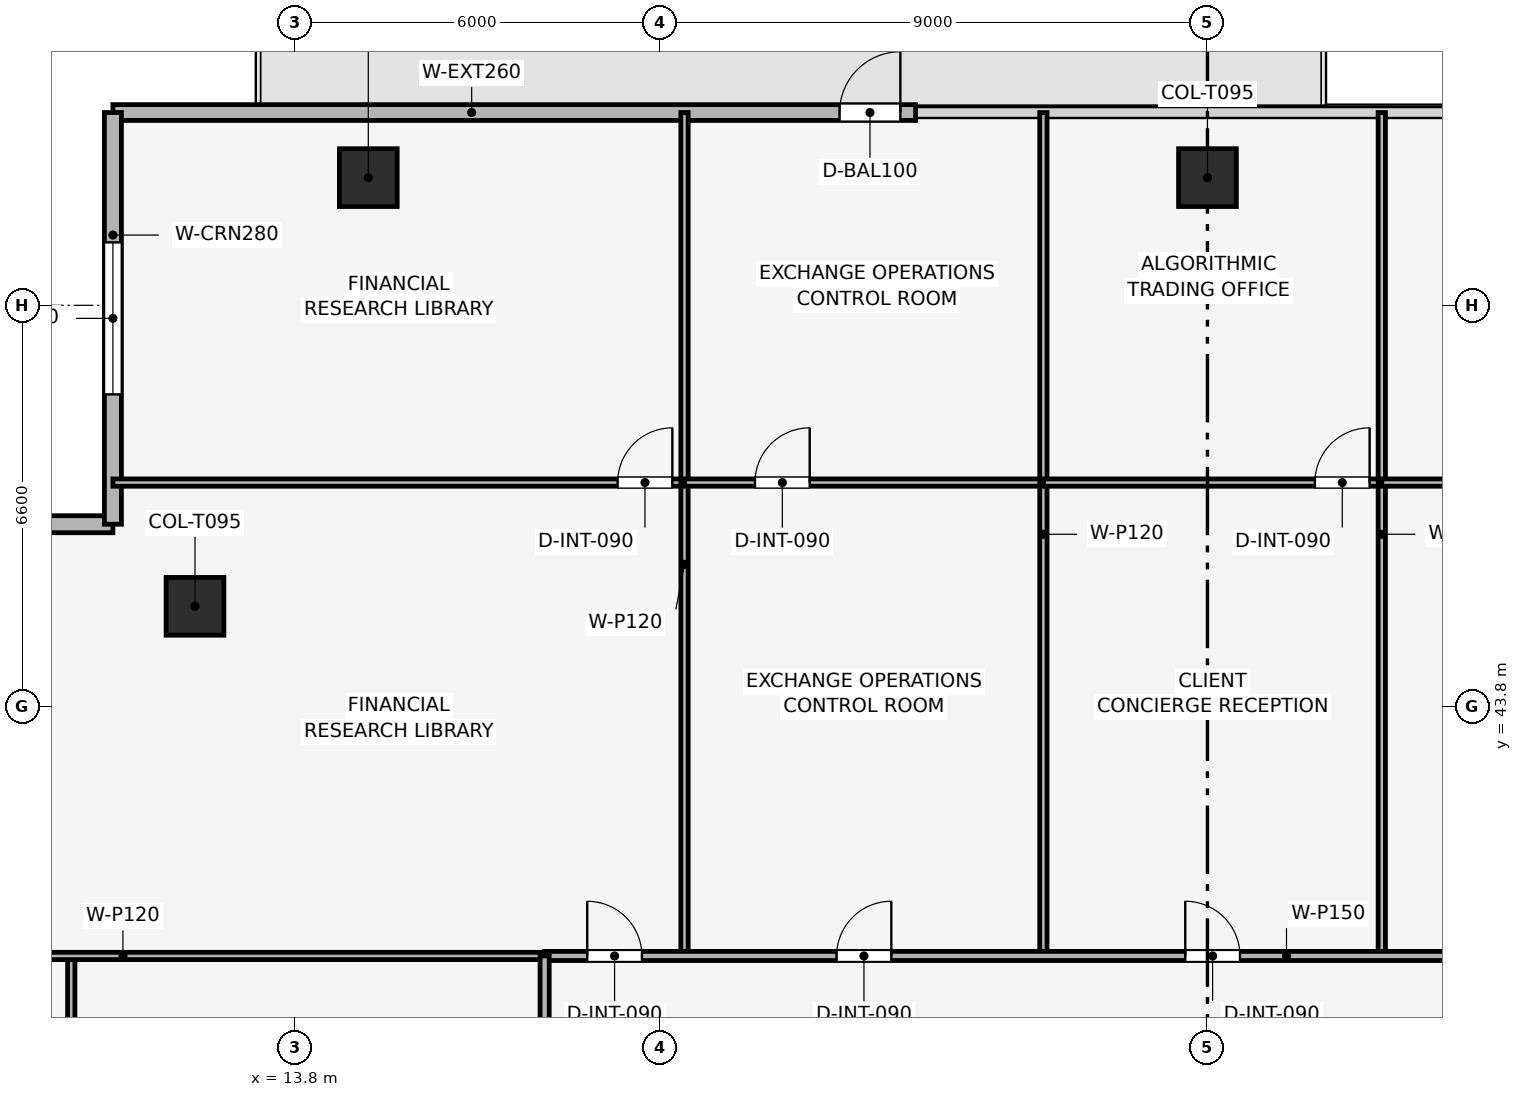
"""IFC4 building model, lengths in metres.
Left out: names, types, materials, properties, quantities, classifications, styles, units other than length and angle.
Written with IfcOpenShell. Run it as: python <this file> out.ifc"""

import sys

from ifc_helpers import new_model, si_unit, direction, frame, frame_2d, origin, origin_2d, place, context, subcontext, project, spatial, rectangle, extrude, element, fill, save


model = new_model("IFC4")
c1 = context("Model", 3, precision=1e-05, world=origin(), true_north=direction((0.0, 1.0)))
c2 = subcontext(c1, "Body", "Model", "MODEL_VIEW")
j1 = project(units=[si_unit("LENGTHUNIT", "METRE"), si_unit("PLANEANGLEUNIT", "RADIAN")], contexts=[c1])
p1 = place(None, origin())
s1 = spatial("IfcSite", under=j1, at=p1, CompositionType="ELEMENT")
p2 = place(p1, origin())
s2 = spatial("IfcBuilding", under=s1, at=p2, CompositionType="ELEMENT")
p3 = place(p2, frame((0.0, 0.0, 269.1)))
s3 = spatial("IfcBuildingStorey", under=s2, at=p3, CompositionType="ELEMENT", Elevation=269.1)
for number, where, z_axis, x_axis in (
    (1, (28.8, 52.5, 0.003), (0.0, 0.0, 1.0), (1.0, 0.0, 0.0)),
    (2, (15.0, 52.5, 0.003), (0.0, 0.0, 1.0), (1.0, 0.0, 0.0)),
    (3, (12.15, 45.45, 0.003), (0.0, 0.0, 1.0), (1.0, 0.0, 0.0)),
):
    element("IfcColumn", number, at=place(p3, frame(where, z_axis=z_axis, x_axis=x_axis)), inside=s3, PredefinedType="COLUMN", context=c2, shape_type="SweptSolid", body=[
        extrude(rectangle(XDim=0.95, YDim=0.95, at=origin_2d()), origin(), (0.0, 0.0, 1.0), 3.494),
    ])
p4 = place(p3, frame((10.8, 53.57, 0.0), z_axis=(0.0, 0.0, 1.0), x_axis=(1.0, 0.0, 0.0)))
e4 = element("IfcWall", 4, at=p4, inside=s3, PredefinedType="SOLIDWALL", context=c2, shape_type="SweptSolid", body=[
    extrude(rectangle(XDim=13.2, YDim=0.26, at=frame_2d((6.6, 0.0))), origin(), (0.0, 0.0, 1.0), 3.5),
])
p5 = place(p4, frame((11.95, 0.0, 0.0)))
e5 = element("IfcOpeningElement", 5, at=p5, cuts=e4, PredefinedType="OPENING", context=c2, shape_type="SweptSolid", body=[
    extrude(rectangle(XDim=1.0, YDim=2.2, at=frame_2d((0.5, 1.1))), frame((0.0, 0.14, 0.0), z_axis=(0.0, -1.0, 0.0), x_axis=(1.0, 0.0, 0.0)), (0.0, 0.0, 1.0), 0.28),
])
p6 = place(p3, frame((4.03, 46.8, 0.0), z_axis=(0.0, 0.0, 1.0), x_axis=(1.0, 0.0, 0.0)))
e6 = element("IfcWall", 6, at=p6, inside=s3, PredefinedType="SOLIDWALL", context=c2, shape_type="SweptSolid", body=[
    extrude(rectangle(XDim=6.77, YDim=0.28, at=frame_2d((3.385, 0.0))), origin(), (0.0, 0.0, 1.0), 3.5),
])
p7 = place(p6, frame((2.135, 0.0, 0.9)))
e7 = element("IfcOpeningElement", 7, at=p7, cuts=e6, PredefinedType="OPENING", context=c2, shape_type="SweptSolid", body=[
    extrude(rectangle(XDim=2.5, YDim=1.9, at=frame_2d((1.25, 0.95))), frame((0.0, 0.15, 0.0), z_axis=(0.0, -1.0, 0.0), x_axis=(1.0, 0.0, 0.0)), (0.0, 0.0, 1.0), 0.3),
])
p8 = place(p3, frame((10.8, 46.8, 0.0), z_axis=(0.0, 0.0, 1.0), x_axis=(0.0, 1.0, 0.0)))
e8 = element("IfcWall", 8, at=p8, inside=s3, PredefinedType="SOLIDWALL", context=c2, shape_type="SweptSolid", body=[
    extrude(rectangle(XDim=6.77, YDim=0.28, at=frame_2d((3.385, 0.0))), origin(), (0.0, 0.0, 1.0), 3.5),
])
p9 = place(p8, frame((2.135, 0.0, 0.9)))
e9 = element("IfcOpeningElement", 9, at=p9, cuts=e8, PredefinedType="OPENING", context=c2, shape_type="SweptSolid", body=[
    extrude(rectangle(XDim=2.5, YDim=1.9, at=frame_2d((1.25, 0.95))), frame((0.0, 0.15, 0.0), z_axis=(0.0, -1.0, 0.0), x_axis=(1.0, 0.0, 0.0)), (0.0, 0.0, 1.0), 0.3),
])
p10 = place(p3, frame((10.8, 47.485, 0.0), z_axis=(0.0, 0.0, 1.0), x_axis=(1.0, 0.0, 0.0)))
e10 = element("IfcWall", 10, at=p10, inside=s3, PredefinedType="PARTITIONING", context=c2, shape_type="SweptSolid", body=[
    extrude(rectangle(XDim=9.4, YDim=0.12, at=frame_2d((4.7, 0.0))), origin(), (0.0, 0.0, 1.0), 3.085),
])
p11 = place(p10, frame((8.3, 0.0, 0.0)))
e11 = element("IfcOpeningElement", 11, at=p11, cuts=e10, PredefinedType="OPENING", context=c2, shape_type="SweptSolid", body=[
    extrude(rectangle(XDim=0.9, YDim=2.1, at=frame_2d((0.45, 1.05))), frame((0.0, 0.07, 0.0), z_axis=(0.0, -1.0, 0.0), x_axis=(1.0, 0.0, 0.0)), (0.0, 0.0, 1.0), 0.14),
])
p12 = place(p3, frame((20.2, 39.7, 0.0), z_axis=(0.0, 0.0, 1.0), x_axis=(0.0, 1.0, 0.0)))
e12 = element("IfcWall", 12, at=p12, inside=s3, PredefinedType="PARTITIONING", context=c2, shape_type="SweptSolid", body=[
    extrude(rectangle(XDim=13.87, YDim=0.12, at=frame_2d((6.935, 0.0))), origin(), (0.0, 0.0, 1.0), 3.085),
])
p13 = place(p3, frame((20.2, 47.485, 0.0), z_axis=(0.0, 0.0, 1.0), x_axis=(1.0, 0.0, 0.0)))
e13 = element("IfcWall", 13, at=p13, inside=s3, PredefinedType="PARTITIONING", context=c2, shape_type="SweptSolid", body=[
    extrude(rectangle(XDim=5.902, YDim=0.12, at=frame_2d((2.951, 0.0))), origin(), (0.0, 0.0, 1.0), 3.085),
])
p14 = place(p13, frame((1.159, 0.0, 0.0)))
e14 = element("IfcOpeningElement", 14, at=p14, cuts=e13, PredefinedType="OPENING", context=c2, shape_type="SweptSolid", body=[
    extrude(rectangle(XDim=0.9, YDim=2.1, at=frame_2d((0.45, 1.05))), frame((0.0, 0.07, 0.0), z_axis=(0.0, -1.0, 0.0), x_axis=(1.0, 0.0, 0.0)), (0.0, 0.0, 1.0), 0.14),
])
p15 = place(p3, frame((26.102, 39.7, 0.0), z_axis=(0.0, 0.0, 1.0), x_axis=(0.0, 1.0, 0.0)))
e15 = element("IfcWall", 15, at=p15, inside=s3, PredefinedType="PARTITIONING", context=c2, shape_type="SweptSolid", body=[
    extrude(rectangle(XDim=13.87, YDim=0.12, at=frame_2d((6.935, 0.0))), origin(), (0.0, 0.0, 1.0), 3.085),
])
p16 = place(p3, frame((26.102, 47.485, 0.0), z_axis=(0.0, 0.0, 1.0), x_axis=(1.0, 0.0, 0.0)))
e16 = element("IfcWall", 16, at=p16, inside=s3, PredefinedType="PARTITIONING", context=c2, shape_type="SweptSolid", body=[
    extrude(rectangle(XDim=5.565, YDim=0.12, at=frame_2d((2.782, 0.0))), origin(), (0.0, 0.0, 1.0), 3.085),
])
p17 = place(p16, frame((4.465, 0.0, 0.0)))
e17 = element("IfcOpeningElement", 17, at=p17, cuts=e16, PredefinedType="OPENING", context=c2, shape_type="SweptSolid", body=[
    extrude(rectangle(XDim=0.9, YDim=2.1, at=frame_2d((0.45, 1.05))), frame((0.0, 0.07, 0.0), z_axis=(0.0, -1.0, 0.0), x_axis=(1.0, 0.0, 0.0)), (0.0, 0.0, 1.0), 0.14),
])
p18 = place(p3, frame((31.667, 39.7, 0.0), z_axis=(0.0, 0.0, 1.0), x_axis=(0.0, 1.0, 0.0)))
e18 = element("IfcWall", 18, at=p18, inside=s3, PredefinedType="PARTITIONING", context=c2, shape_type="SweptSolid", body=[
    extrude(rectangle(XDim=13.87, YDim=0.12, at=frame_2d((6.935, 0.0))), origin(), (0.0, 0.0, 1.0), 3.085),
])
p19 = place(p3, frame((31.667, 47.485, 0.0), z_axis=(0.0, 0.0, 1.0), x_axis=(1.0, 0.0, 0.0)))
e19 = element("IfcWall", 19, at=p19, inside=s3, PredefinedType="PARTITIONING", context=c2, shape_type="SweptSolid", body=[
    extrude(rectangle(XDim=15.133, YDim=0.12, at=frame_2d((7.566, 0.0))), origin(), (0.0, 0.0, 1.0), 3.085),
])
p20 = place(p19, frame((3.658, 0.0, 0.0)))
e20 = element("IfcOpeningElement", 20, at=p20, cuts=e19, PredefinedType="OPENING", context=c2, shape_type="SweptSolid", body=[
    extrude(rectangle(XDim=0.9, YDim=2.1, at=frame_2d((0.45, 1.05))), frame((0.0, 0.07, 0.0), z_axis=(0.0, -1.0, 0.0), x_axis=(1.0, 0.0, 0.0)), (0.0, 0.0, 1.0), 0.14),
])
p21 = place(p3, frame((10.115, 25.055, 0.0), z_axis=(0.0, 0.0, 1.0), x_axis=(0.0, 1.0, 0.0)))
e21 = element("IfcWall", 21, at=p21, inside=s3, PredefinedType="PARTITIONING", context=c2, shape_type="SweptSolid", body=[
    extrude(rectangle(XDim=14.645, YDim=0.12, at=frame_2d((7.323, 0.0))), origin(), (0.0, 0.0, 1.0), 3.085),
])
p22 = place(p21, frame((10.209, 0.0, 0.0)))
e22 = element("IfcOpeningElement", 22, at=p22, cuts=e21, PredefinedType="OPENING", context=c2, shape_type="SweptSolid", body=[
    extrude(rectangle(XDim=0.9, YDim=2.1, at=frame_2d((0.45, 1.05))), frame((0.0, 0.07, 0.0), z_axis=(0.0, -1.0, 0.0), x_axis=(1.0, 0.0, 0.0)), (0.0, 0.0, 1.0), 0.14),
])
p23 = place(p3, frame((4.03, 39.7, 0.0), z_axis=(0.0, 0.0, 1.0), x_axis=(1.0, 0.0, 0.0)))
e23 = element("IfcWall", 23, at=p23, inside=s3, PredefinedType="PARTITIONING", context=c2, shape_type="SweptSolid", body=[
    extrude(rectangle(XDim=13.87, YDim=0.12, at=frame_2d((6.935, 0.0))), origin(), (0.0, 0.0, 1.0), 3.085),
])
p24 = place(p3, frame((17.9, 39.7, 0.0), z_axis=(0.0, 0.0, 1.0), x_axis=(1.0, 0.0, 0.0)))
e24 = element("IfcWall", 24, at=p24, inside=s3, PredefinedType="PARTITIONING", context=c2, shape_type="SweptSolid", body=[
    extrude(rectangle(XDim=21.8, YDim=0.15, at=frame_2d((10.9, 0.0))), origin(), (0.0, 0.0, 1.0), 3.085),
])
p25 = place(p24, frame((0.7, 0.0, 0.0)))
e25 = element("IfcOpeningElement", 25, at=p25, cuts=e24, PredefinedType="OPENING", context=c2, shape_type="SweptSolid", body=[
    extrude(rectangle(XDim=0.9, YDim=2.1, at=frame_2d((0.45, 1.05))), frame((0.0, 0.085, 0.0), z_axis=(0.0, -1.0, 0.0), x_axis=(1.0, 0.0, 0.0)), (0.0, 0.0, 1.0), 0.17),
])
p26 = place(p24, frame((4.801, 0.0, 0.0)))
e26 = element("IfcOpeningElement", 26, at=p26, cuts=e24, PredefinedType="OPENING", context=c2, shape_type="SweptSolid", body=[
    extrude(rectangle(XDim=0.9, YDim=2.1, at=frame_2d((0.45, 1.05))), frame((0.0, 0.085, 0.0), z_axis=(0.0, -1.0, 0.0), x_axis=(1.0, 0.0, 0.0)), (0.0, 0.0, 1.0), 0.17),
])
p27 = place(p24, frame((10.535, 0.0, 0.0)))
e27 = element("IfcOpeningElement", 27, at=p27, cuts=e24, PredefinedType="OPENING", context=c2, shape_type="SweptSolid", body=[
    extrude(rectangle(XDim=0.9, YDim=2.1, at=frame_2d((0.45, 1.05))), frame((0.0, 0.085, 0.0), z_axis=(0.0, -1.0, 0.0), x_axis=(1.0, 0.0, 0.0)), (0.0, 0.0, 1.0), 0.17),
])
p28 = place(p24, frame((17.334, 0.0, 0.0)))
e28 = element("IfcOpeningElement", 28, at=p28, cuts=e24, PredefinedType="OPENING", context=c2, shape_type="SweptSolid", body=[
    extrude(rectangle(XDim=0.9, YDim=2.1, at=frame_2d((0.45, 1.05))), frame((0.0, 0.085, 0.0), z_axis=(0.0, -1.0, 0.0), x_axis=(1.0, 0.0, 0.0)), (0.0, 0.0, 1.0), 0.17),
])
p29 = place(p3, frame((17.9, 10.8, 0.0), z_axis=(0.0, 0.0, 1.0), x_axis=(0.0, 1.0, 0.0)))
e29 = element("IfcWall", 29, at=p29, inside=s3, PredefinedType="PARTITIONING", context=c2, shape_type="SweptSolid", body=[
    extrude(rectangle(XDim=28.9, YDim=0.15, at=frame_2d((14.45, 0.0))), origin(), (0.0, 0.0, 1.0), 3.085),
])
p30 = place(p29, frame((0.7, 0.0, 0.0)))
e30 = element("IfcOpeningElement", 30, at=p30, cuts=e29, PredefinedType="OPENING", context=c2, shape_type="SweptSolid", body=[
    extrude(rectangle(XDim=0.9, YDim=2.1, at=frame_2d((0.45, 1.05))), frame((0.0, 0.085, 0.0), z_axis=(0.0, -1.0, 0.0), x_axis=(1.0, 0.0, 0.0)), (0.0, 0.0, 1.0), 0.17),
])
p31 = place(p29, frame((7.828, 0.0, 0.0)))
e31 = element("IfcOpeningElement", 31, at=p31, cuts=e29, PredefinedType="OPENING", context=c2, shape_type="SweptSolid", body=[
    extrude(rectangle(XDim=0.9, YDim=2.1, at=frame_2d((0.45, 1.05))), frame((0.0, 0.085, 0.0), z_axis=(0.0, -1.0, 0.0), x_axis=(1.0, 0.0, 0.0)), (0.0, 0.0, 1.0), 0.17),
])
p32 = place(p29, frame((21.127, 0.0, 0.0)))
e32 = element("IfcOpeningElement", 32, at=p32, cuts=e29, PredefinedType="OPENING", context=c2, shape_type="SweptSolid", body=[
    extrude(rectangle(XDim=0.9, YDim=2.1, at=frame_2d((0.45, 1.05))), frame((0.0, 0.085, 0.0), z_axis=(0.0, -1.0, 0.0), x_axis=(1.0, 0.0, 0.0)), (0.0, 0.0, 1.0), 0.17),
])
p33 = place(p5, origin())
e33 = element("IfcDoor", 33, at=p33, inside=s3, OperationType="SINGLE_SWING_RIGHT", PredefinedType="DOOR", context=c2, shape_type="SweptSolid", body=[
    extrude(rectangle(XDim=1.0, YDim=2.2, at=frame_2d((0.5, 1.1))), frame((0.0, 0.025, 0.0), z_axis=(0.0, -1.0, 0.0), x_axis=(1.0, 0.0, 0.0)), (0.0, 0.0, 1.0), 0.05),
])
fill(e5, e33)
p34 = place(p9, origin())
e34 = element("IfcWindow", 34, at=p34, inside=s3, PartitioningType="SINGLE_PANEL", PredefinedType="WINDOW", context=c2, shape_type="SweptSolid", body=[
    extrude(rectangle(XDim=2.5, YDim=1.9, at=frame_2d((1.25, 0.95))), frame((0.0, 0.03, 0.0), z_axis=(0.0, -1.0, 0.0), x_axis=(1.0, 0.0, 0.0)), (0.0, 0.0, 1.0), 0.06),
])
fill(e9, e34)
p35 = place(p11, origin())
e35 = element("IfcDoor", 35, at=p35, inside=s3, OperationType="SINGLE_SWING_RIGHT", PredefinedType="DOOR", context=c2, shape_type="SweptSolid", body=[
    extrude(rectangle(XDim=0.9, YDim=2.1, at=frame_2d((0.45, 1.05))), frame((0.0, 0.025, 0.0), z_axis=(0.0, -1.0, 0.0), x_axis=(1.0, 0.0, 0.0)), (0.0, 0.0, 1.0), 0.05),
])
fill(e11, e35)
p36 = place(p14, origin())
e36 = element("IfcDoor", 36, at=p36, inside=s3, OperationType="SINGLE_SWING_RIGHT", PredefinedType="DOOR", context=c2, shape_type="SweptSolid", body=[
    extrude(rectangle(XDim=0.9, YDim=2.1, at=frame_2d((0.45, 1.05))), frame((0.0, 0.025, 0.0), z_axis=(0.0, -1.0, 0.0), x_axis=(1.0, 0.0, 0.0)), (0.0, 0.0, 1.0), 0.05),
])
fill(e14, e36)
p37 = place(p17, origin())
e37 = element("IfcDoor", 37, at=p37, inside=s3, OperationType="SINGLE_SWING_RIGHT", PredefinedType="DOOR", context=c2, shape_type="SweptSolid", body=[
    extrude(rectangle(XDim=0.9, YDim=2.1, at=frame_2d((0.45, 1.05))), frame((0.0, 0.025, 0.0), z_axis=(0.0, -1.0, 0.0), x_axis=(1.0, 0.0, 0.0)), (0.0, 0.0, 1.0), 0.05),
])
fill(e17, e37)
p38 = place(p25, origin())
e38 = element("IfcDoor", 38, at=p38, inside=s3, OperationType="SINGLE_SWING_LEFT", PredefinedType="DOOR", context=c2, shape_type="SweptSolid", body=[
    extrude(rectangle(XDim=0.9, YDim=2.1, at=frame_2d((0.45, 1.05))), frame((0.0, 0.025, 0.0), z_axis=(0.0, -1.0, 0.0), x_axis=(1.0, 0.0, 0.0)), (0.0, 0.0, 1.0), 0.05),
])
fill(e25, e38)
p39 = place(p26, origin())
e39 = element("IfcDoor", 39, at=p39, inside=s3, OperationType="SINGLE_SWING_RIGHT", PredefinedType="DOOR", context=c2, shape_type="SweptSolid", body=[
    extrude(rectangle(XDim=0.9, YDim=2.1, at=frame_2d((0.45, 1.05))), frame((0.0, 0.025, 0.0), z_axis=(0.0, -1.0, 0.0), x_axis=(1.0, 0.0, 0.0)), (0.0, 0.0, 1.0), 0.05),
])
fill(e26, e39)
p40 = place(p27, origin())
e40 = element("IfcDoor", 40, at=p40, inside=s3, OperationType="SINGLE_SWING_LEFT", PredefinedType="DOOR", context=c2, shape_type="SweptSolid", body=[
    extrude(rectangle(XDim=0.9, YDim=2.1, at=frame_2d((0.45, 1.05))), frame((0.0, 0.025, 0.0), z_axis=(0.0, -1.0, 0.0), x_axis=(1.0, 0.0, 0.0)), (0.0, 0.0, 1.0), 0.05),
])
fill(e27, e40)
save(model, sys.argv[1])
